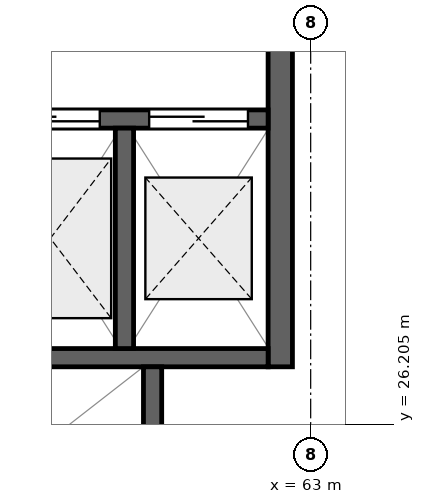
"""IFC4 building model, lengths in metres.
Left out: names, types, materials, properties, quantities, classifications, styles, units other than length and angle.
Written with IfcOpenShell. Run it as: python <this file> out.ifc"""

import sys

from ifc_helpers import new_model, si_unit, direction, frame, frame_2d, origin, place, context, subcontext, project, spatial, rectangle, extrude, element, fill, save


model = new_model("IFC4")
c1 = context("Model", 3, precision=1e-05, world=origin(), true_north=direction((0.0, 1.0)))
c2 = subcontext(c1, "Body", "Model", "MODEL_VIEW")
j1 = project(units=[si_unit("LENGTHUNIT", "METRE"), si_unit("PLANEANGLEUNIT", "RADIAN")], contexts=[c1])
p1 = place(None, origin())
s1 = spatial("IfcSite", under=j1, at=p1, CompositionType="ELEMENT")
p2 = place(p1, origin())
s2 = spatial("IfcBuilding", under=s1, at=p2, CompositionType="ELEMENT")
p3 = place(p2, frame((0.0, 0.0, 9.9)))
s3 = spatial("IfcBuildingStorey", under=s2, at=p3, CompositionType="ELEMENT", Elevation=9.9)
p4 = place(p3, frame((62.6, 26.96, 0.0), z_axis=(0.0, 0.0, 1.0), x_axis=(0.0, 1.0, 0.0)))
e1 = element("IfcWall", 1, at=p4, inside=s3, PredefinedType="SHEAR", context=c2, shape_type="SweptSolid", body=[
    extrude(rectangle(XDim=9.04, YDim=0.32, at=frame_2d((4.52, 0.0))), origin(), (0.0, 0.0, 1.0), 4.16),
])
p5 = place(p3, frame((58.54, 30.22, 0.0), z_axis=(0.0, 0.0, 1.0), x_axis=(1.0, 0.0, 0.0)))
e2 = element("IfcWall", 2, at=p5, inside=s3, PredefinedType="SHEAR", context=c2, shape_type="SweptSolid", body=[
    extrude(rectangle(XDim=3.9, YDim=0.24, at=frame_2d((1.95, 0.0))), origin(), (0.0, 0.0, 1.0), 4.31),
])
p6 = place(p5, frame((0.385, 0.0, 0.0)))
e3 = element("IfcOpeningElement", 3, at=p6, cuts=e2, PredefinedType="OPENING", context=c2, shape_type="SweptSolid", body=[
    extrude(rectangle(XDim=1.3, YDim=2.2, at=frame_2d((0.65, 1.1))), frame((0.0, 0.135, 0.0), z_axis=(0.0, -1.0, 0.0), x_axis=(1.0, 0.0, 0.0)), (0.0, 0.0, 1.0), 0.27),
])
p7 = place(p5, frame((2.335, 0.0, 0.0)))
e4 = element("IfcOpeningElement", 4, at=p7, cuts=e2, PredefinedType="OPENING", context=c2, shape_type="SweptSolid", body=[
    extrude(rectangle(XDim=1.3, YDim=2.2, at=frame_2d((0.65, 1.1))), frame((0.0, 0.135, 0.0), z_axis=(0.0, -1.0, 0.0), x_axis=(1.0, 0.0, 0.0)), (0.0, 0.0, 1.0), 0.27),
])
p8 = place(p3, frame((58.54, 27.08, 0.0), z_axis=(0.0, 0.0, 1.0), x_axis=(1.0, 0.0, 0.0)))
e5 = element("IfcWall", 5, at=p8, inside=s3, PredefinedType="SHEAR", context=c2, shape_type="SweptSolid", body=[
    extrude(rectangle(XDim=3.9, YDim=0.24, at=frame_2d((1.95, 0.0))), origin(), (0.0, 0.0, 1.0), 4.31),
])
p9 = place(p3, frame((60.55, 27.2, 0.0), z_axis=(0.0, 0.0, 1.0), x_axis=(0.0, 1.0, 0.0)))
e6 = element("IfcWall", 6, at=p9, inside=s3, PredefinedType="SHEAR", context=c2, shape_type="SweptSolid", body=[
    extrude(rectangle(XDim=2.9, YDim=0.24, at=frame_2d((1.45, 0.0))), origin(), (0.0, 0.0, 1.0), 4.31),
])
p10 = place(p3, frame((60.92, 24.96, 0.0), z_axis=(0.0, 0.0, 1.0), x_axis=(0.0, 1.0, 0.0)))
e7 = element("IfcWall", 7, at=p10, inside=s3, PredefinedType="SHEAR", context=c2, shape_type="SweptSolid", body=[
    extrude(rectangle(XDim=2.0, YDim=0.24, at=frame_2d((1.0, 0.0))), origin(), (0.0, 0.0, 1.0), 4.31),
])
p11 = place(p6, origin())
e8 = element("IfcDoor", 8, at=p11, inside=s3, OperationType="DOUBLE_DOOR_SLIDING", PredefinedType="DOOR", context=c2, shape_type="SweptSolid", body=[
    extrude(rectangle(XDim=1.3, YDim=2.2, at=frame_2d((0.65, 1.1))), frame((0.0, 0.025, 0.0), z_axis=(0.0, -1.0, 0.0), x_axis=(1.0, 0.0, 0.0)), (0.0, 0.0, 1.0), 0.05),
])
fill(e3, e8)
p12 = place(p7, origin())
e9 = element("IfcDoor", 9, at=p12, inside=s3, OperationType="DOUBLE_DOOR_SLIDING", PredefinedType="DOOR", context=c2, shape_type="SweptSolid", body=[
    extrude(rectangle(XDim=1.3, YDim=2.2, at=frame_2d((0.65, 1.1))), frame((0.0, 0.025, 0.0), z_axis=(0.0, -1.0, 0.0), x_axis=(1.0, 0.0, 0.0)), (0.0, 0.0, 1.0), 0.05),
])
fill(e4, e9)
save(model, sys.argv[1])
